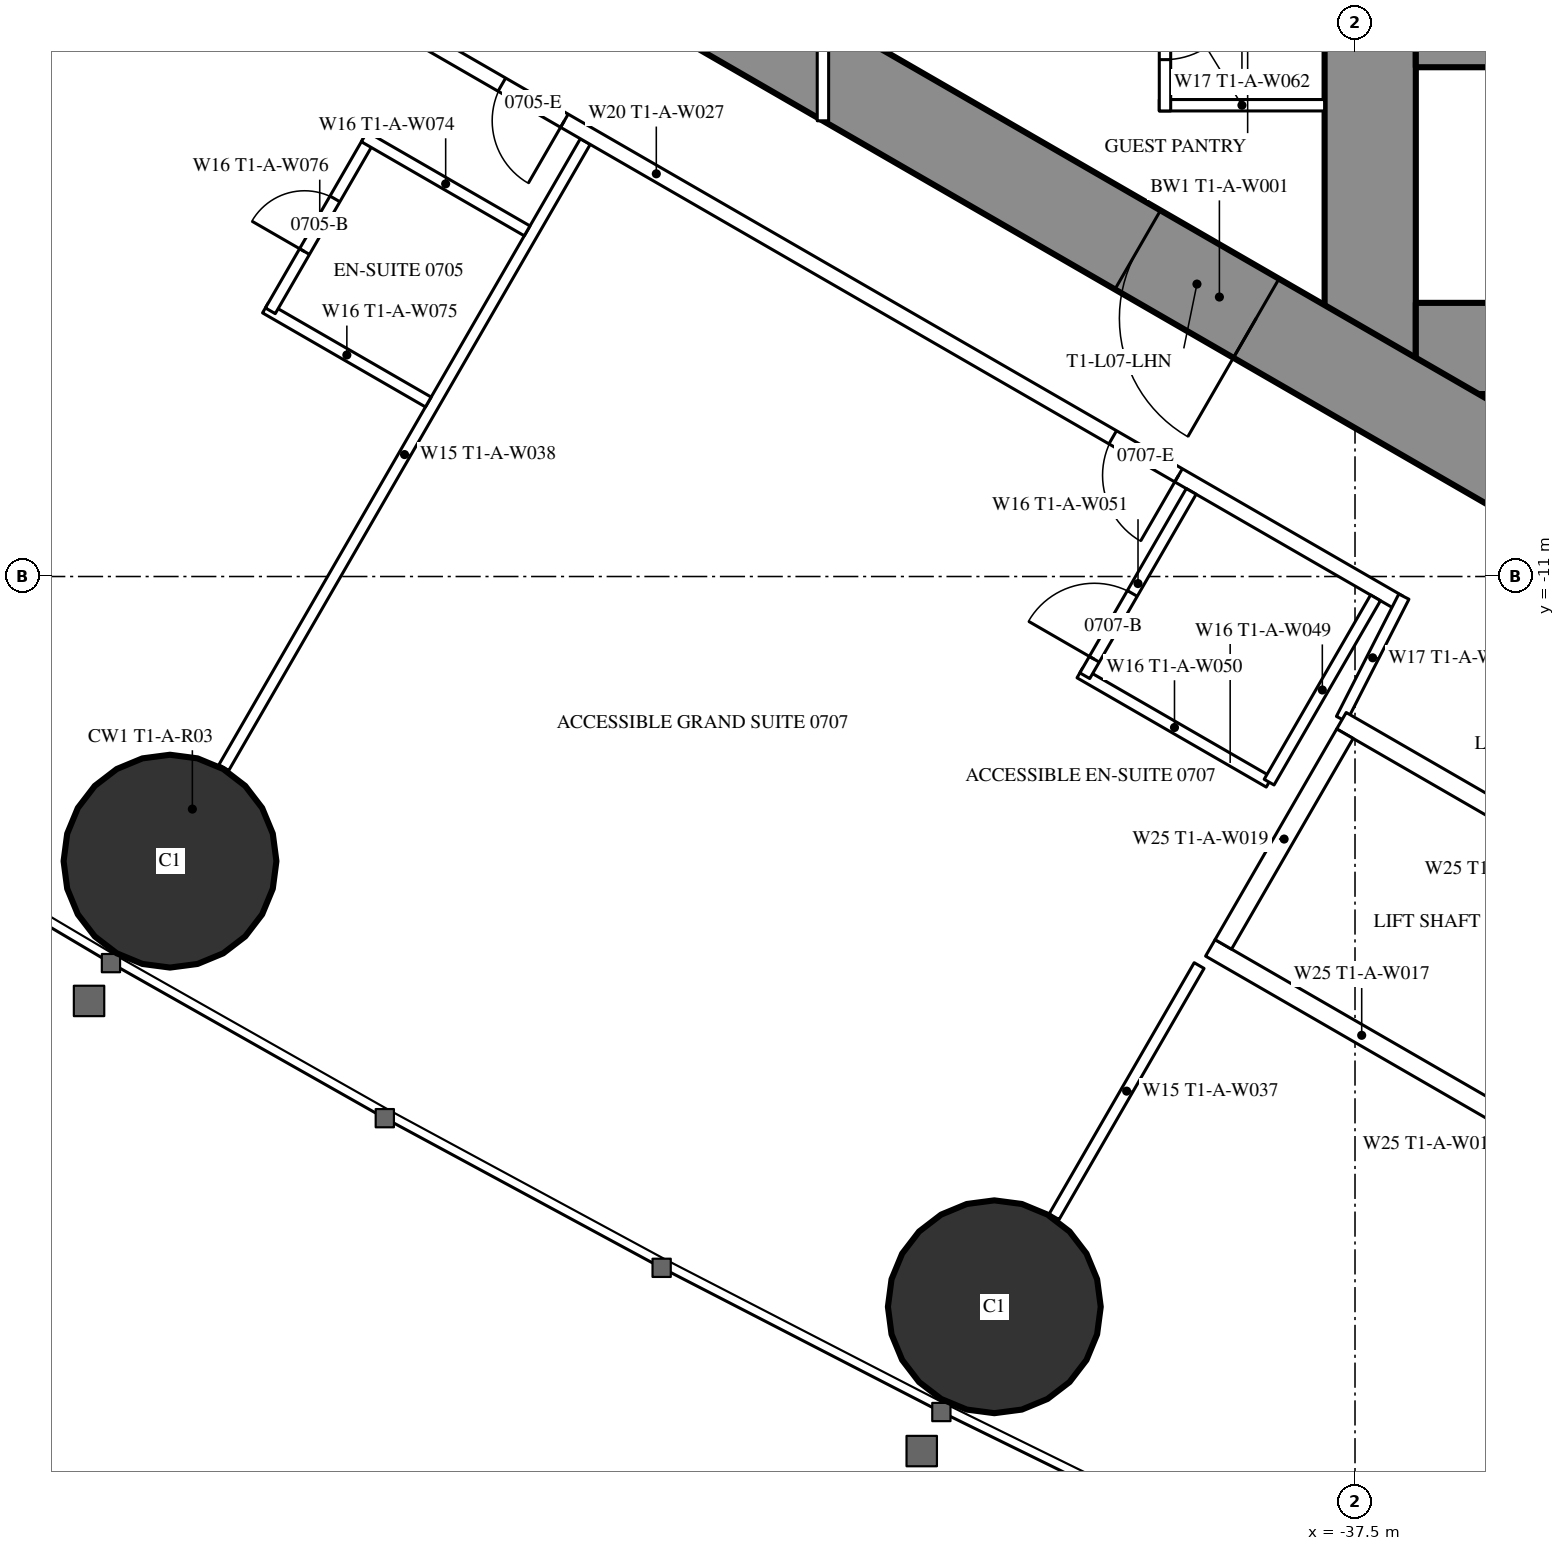
"""IFC4 building model, lengths in metres.
Left out: names, types, materials, properties, quantities, classifications, styles, units other than length and angle.
Written with IfcOpenShell. Run it as: python <this file> out.ifc"""

import sys

from ifc_helpers import new_model, si_unit, direction, frame, frame_2d, origin, origin_2d, place, context, subcontext, project, spatial, rectangle, hollow_circle, extrude, element, fill, save


model = new_model("IFC4")
c1 = context("Model", 3, precision=1e-05, world=origin(), true_north=direction((0.0, 1.0)))
c2 = subcontext(c1, "Body", "Model", "MODEL_VIEW")
j1 = project(units=[si_unit("LENGTHUNIT", "METRE"), si_unit("PLANEANGLEUNIT", "RADIAN")], contexts=[c1])
p1 = place(None, origin())
s1 = spatial("IfcSite", under=j1, at=p1, CompositionType="ELEMENT")
p2 = place(p1, origin())
s2 = spatial("IfcBuilding", under=s1, at=p2, CompositionType="ELEMENT")
p3 = place(p2, frame((0.0, 0.0, 32.0)))
s3 = spatial("IfcBuildingStorey", under=s2, at=p3, CompositionType="ELEMENT", Elevation=32.0)
for number, where, z_axis, x_axis in (
    (1, (-53.09, -14.745, 0.0), (0.0, 0.0, 1.0), (1.0, 0.0, 0.0)),
    (2, (-42.245, -20.607, 0.0), (0.0, 0.0, 1.0), (1.0, 0.0, 0.0)),
):
    element("IfcColumn", number, at=place(p3, frame(where, z_axis=z_axis, x_axis=x_axis)), inside=s3, PredefinedType="COLUMN", context=c2, shape_type="SweptSolid", body=[
        extrude(hollow_circle(Radius=1.4, WallThickness=0.12, at=origin_2d()), origin(), (0.0, 0.0, 1.0), 3.5),
    ])
p4 = place(p3, frame((-37.3, 8.6, 0.0), z_axis=(0.0, 0.0, 1.0), x_axis=(0.0, -1.0, 0.0)))
e3 = element("IfcWall", 3, at=p4, inside=s3, PredefinedType="SHEAR", context=c2, shape_type="SweptSolid", body=[
    extrude(rectangle(XDim=17.2, YDim=1.2, at=frame_2d((8.6, 0.0))), origin(), (0.0, 0.0, 1.0), 3.5),
])
p5 = place(p4, frame((7.7, 0.0, 0.0)))
e4 = element("IfcOpeningElement", 4, at=p5, cuts=e3, PredefinedType="OPENING", context=c2, shape_type="SweptSolid", body=[
    extrude(rectangle(XDim=1.8, YDim=2.2, at=frame_2d((0.9, 1.1))), frame((0.0, 0.61, 0.0), z_axis=(0.0, -1.0, 0.0), x_axis=(1.0, 0.0, 0.0)), (0.0, 0.0, 1.0), 1.22),
])
p6 = place(p3, frame((-28.3, -8.0, 0.0), z_axis=(0.0, 0.0, 1.0), x_axis=(-1.0, 0.0, 0.0)))
e5 = element("IfcWall", 5, at=p6, inside=s3, PredefinedType="SHEAR", context=c2, shape_type="SweptSolid", body=[
    extrude(rectangle(XDim=8.4, YDim=1.2, at=frame_2d((4.2, 0.0))), origin(), (0.0, 0.0, 1.0), 3.5),
])
p7 = place(p6, frame((0.25, 0.0, 0.0)))
e6 = element("IfcOpeningElement", 6, at=p7, cuts=e5, PredefinedType="OPENING", context=c2, shape_type="SweptSolid", body=[
    extrude(rectangle(XDim=1.0, YDim=2.2, at=frame_2d((0.5, 1.1))), frame((0.0, 0.61, 0.0), z_axis=(0.0, -1.0, 0.0), x_axis=(1.0, 0.0, 0.0)), (0.0, 0.0, 1.0), 1.22),
])
p8 = place(p3, frame((-28.3, -4.15, 0.0), z_axis=(0.0, 0.0, 1.0), x_axis=(-1.0, 0.0, 0.0)))
e7 = element("IfcWall", 7, at=p8, inside=s3, PredefinedType="SHEAR", context=c2, shape_type="SweptSolid", body=[
    extrude(rectangle(XDim=8.4, YDim=0.3, at=frame_2d((4.2, 0.0))), origin(), (0.0, 0.0, 1.0), 3.5),
])
p9 = place(p3, frame((-27.2, -14.3, 0.0), z_axis=(0.0, 0.0, 1.0), x_axis=(-0.866024021859, 0.500002393557, 0.0)))
e8 = element("IfcWall", 8, at=p9, inside=s3, PredefinedType="SHEAR", context=c2, shape_type="SweptSolid", body=[
    extrude(rectangle(XDim=27.907, YDim=1.2, at=frame_2d((13.954, 0.0))), origin(), (0.0, 0.0, 1.0), 3.5),
])
p10 = place(p9, frame((4.6, 0.0, 0.0)))
e9 = element("IfcOpeningElement", 9, at=p10, cuts=e8, PredefinedType="OPENING", context=c2, shape_type="SweptSolid", body=[
    extrude(rectangle(XDim=1.0, YDim=2.2, at=frame_2d((0.5, 1.1))), frame((0.0, 0.61, 0.0), z_axis=(0.0, -1.0, 0.0), x_axis=(1.0, 0.0, 0.0)), (0.0, 0.0, 1.0), 1.22),
])
p11 = place(p9, frame((13.395, 0.0, 0.0)))
e10 = element("IfcOpeningElement", 10, at=p11, cuts=e8, PredefinedType="OPENING", context=c2, shape_type="SweptSolid", body=[
    extrude(rectangle(XDim=1.8, YDim=2.2, at=frame_2d((0.9, 1.1))), frame((0.0, 0.61, 0.0), z_axis=(0.0, -1.0, 0.0), x_axis=(1.0, 0.0, 0.0)), (0.0, 0.0, 1.0), 1.22),
])
p12 = place(p3, frame((-47.627, -5.278, 0.0), z_axis=(0.0, 0.0, 1.0), x_axis=(-0.500009844318, -0.86601972009, 0.0)))
e11 = element("IfcWall", 11, at=p12, inside=s3, PredefinedType="PARTITIONING", context=c2, shape_type="SweptSolid", body=[
    extrude(rectangle(XDim=9.51, YDim=0.15, at=frame_2d((4.755, 0.0))), origin(), (0.0, 0.0, 1.0), 2.25),
])
p13 = place(p3, frame((-39.551, -16.118, 0.0), z_axis=(0.0, 0.0, 1.0), x_axis=(-0.499986503906, -0.866033195618, 0.0)))
e12 = element("IfcWall", 12, at=p13, inside=s3, PredefinedType="PARTITIONING", context=c2, shape_type="SweptSolid", body=[
    extrude(rectangle(XDim=3.815, YDim=0.15, at=frame_2d((1.907, 0.0))), origin(), (0.0, 0.0, 1.0), 3.25),
])
p14 = place(p3, frame((-36.92, -11.344, 0.0), z_axis=(0.0, 0.0, 1.0), x_axis=(-0.866028313256, 0.499994960614, 0.0)))
e13 = element("IfcWall", 13, at=p14, inside=s3, PredefinedType="PARTITIONING", context=c2, shape_type="SweptSolid", body=[
    extrude(rectangle(XDim=22.568, YDim=0.2, at=frame_2d((11.284, 0.0))), origin(), (0.0, 0.0, 1.0), 3.25),
])
p15 = place(p14, frame((12.68, 0.0, 0.0)))
e14 = element("IfcOpeningElement", 14, at=p15, cuts=e13, PredefinedType="OPENING", context=c2, shape_type="SweptSolid", body=[
    extrude(rectangle(XDim=0.95, YDim=2.2, at=frame_2d((0.475, 1.1))), frame((0.0, 0.11, 0.0), z_axis=(0.0, -1.0, 0.0), x_axis=(1.0, 0.0, 0.0)), (0.0, 0.0, 1.0), 0.22),
])
p16 = place(p14, frame((3.35, 0.0, 0.0)))
e15 = element("IfcOpeningElement", 15, at=p16, cuts=e13, PredefinedType="OPENING", context=c2, shape_type="SweptSolid", body=[
    extrude(rectangle(XDim=1.0, YDim=2.2, at=frame_2d((0.5, 1.1))), frame((0.0, 0.11, 0.0), z_axis=(0.0, -1.0, 0.0), x_axis=(1.0, 0.0, 0.0)), (0.0, 0.0, 1.0), 0.22),
])
p17 = place(p3, frame((-36.857, -11.265, 0.0), z_axis=(0.0, 0.0, 1.0), x_axis=(-0.454225294761, -0.890886851176, 0.0)))
e16 = element("IfcWall", 16, at=p17, inside=s3, PredefinedType="PARTITIONING", context=c2, shape_type="SweptSolid", body=[
    extrude(rectangle(XDim=1.807, YDim=0.15, at=frame_2d((0.904, 0.0))), origin(), (0.0, 0.0, 1.0), 3.25),
])
p18 = place(p3, frame((-49.692, -8.704, 0.0), z_axis=(0.0, 0.0, 1.0), x_axis=(-0.866073894602, 0.499916002032, 0.0)))
e17 = element("IfcWall", 17, at=p18, inside=s3, PredefinedType="PARTITIONING", context=c2, shape_type="SweptSolid", body=[
    extrude(rectangle(XDim=2.475, YDim=0.15, at=frame_2d((1.238, 0.0))), origin(), (0.0, 0.0, 1.0), 3.25),
])
p19 = place(p3, frame((-50.47, -5.253, 0.0), z_axis=(0.0, 0.0, 1.0), x_axis=(-0.500006934395, -0.866021400173, 0.0)))
e18 = element("IfcWall", 18, at=p19, inside=s3, PredefinedType="PARTITIONING", context=c2, shape_type="SweptSolid", body=[
    extrude(rectangle(XDim=2.6, YDim=0.15, at=frame_2d((1.3, 0.0))), origin(), (0.0, 0.0, 1.0), 3.25),
])
p20 = place(p19, frame((0.9, 0.0, 0.0)))
e19 = element("IfcOpeningElement", 19, at=p20, cuts=e18, PredefinedType="OPENING", context=c2, shape_type="SweptSolid", body=[
    extrude(rectangle(XDim=0.8, YDim=2.2, at=frame_2d((0.4, 1.1))), frame((0.0, 0.085, 0.0), z_axis=(0.0, -1.0, 0.0), x_axis=(1.0, 0.0, 0.0)), (0.0, 0.0, 1.0), 0.17),
])
p21 = place(p3, frame((-48.392, -6.453, 0.0), z_axis=(0.0, 0.0, 1.0), x_axis=(-0.86604923931, 0.499958713387, 0.0)))
e20 = element("IfcWall", 20, at=p21, inside=s3, PredefinedType="PARTITIONING", context=c2, shape_type="SweptSolid", body=[
    extrude(rectangle(XDim=2.475, YDim=0.15, at=frame_2d((1.237, 0.0))), origin(), (0.0, 0.0, 1.0), 3.25),
])
p22 = place(p3, frame((-38.63, -13.705, 0.0), z_axis=(0.0, 0.0, 1.0), x_axis=(-0.866018712932, 0.500011588718, 0.0)))
e21 = element("IfcWall", 21, at=p22, inside=s3, PredefinedType="PARTITIONING", context=c2, shape_type="SweptSolid", body=[
    extrude(rectangle(XDim=2.875, YDim=0.15, at=frame_2d((1.438, 0.0))), origin(), (0.0, 0.0, 1.0), 3.25),
])
p23 = place(p3, frame((-39.655, -9.88, 0.0), z_axis=(0.0, 0.0, 1.0), x_axis=(-0.500049511043, -0.865996816683, 0.0)))
e22 = element("IfcWall", 22, at=p23, inside=s3, PredefinedType="PARTITIONING", context=c2, shape_type="SweptSolid", body=[
    extrude(rectangle(XDim=2.8, YDim=0.15, at=frame_2d((1.4, 0.0))), origin(), (0.0, 0.0, 1.0), 3.25),
])
p24 = place(p23, frame((1.55, 0.0, 0.0)))
e23 = element("IfcOpeningElement", 23, at=p24, cuts=e22, PredefinedType="OPENING", context=c2, shape_type="SweptSolid", body=[
    extrude(rectangle(XDim=1.0, YDim=2.2, at=frame_2d((0.5, 1.1))), frame((0.0, 0.085, 0.0), z_axis=(0.0, -1.0, 0.0), x_axis=(1.0, 0.0, 0.0)), (0.0, 0.0, 1.0), 0.17),
])
p25 = place(p3, frame((-37.23, -11.281, 0.0), z_axis=(0.0, 0.0, 1.0), x_axis=(-0.500049511043, -0.865996816683, 0.0)))
e24 = element("IfcWall", 24, at=p25, inside=s3, PredefinedType="PARTITIONING", context=c2, shape_type="SweptSolid", body=[
    extrude(rectangle(XDim=2.8, YDim=0.15, at=frame_2d((1.4, 0.0))), origin(), (0.0, 0.0, 1.0), 3.25),
])
p26 = place(p3, frame((-37.9, -4.8, 0.0), z_axis=(0.0, 0.0, 1.0), x_axis=(-1.0, 0.0, 0.0)))
e25 = element("IfcWall", 25, at=p26, inside=s3, PredefinedType="PARTITIONING", context=c2, shape_type="SweptSolid", body=[
    extrude(rectangle(XDim=2.175, YDim=0.15, at=frame_2d((1.087, 0.0))), origin(), (0.0, 0.0, 1.0), 3.25),
])
p27 = place(p3, frame((-40.0, -2.525, 0.0), z_axis=(0.0, 0.0, 1.0), x_axis=(0.0, -1.0, 0.0)))
e26 = element("IfcWall", 26, at=p27, inside=s3, PredefinedType="PARTITIONING", context=c2, shape_type="SweptSolid", body=[
    extrude(rectangle(XDim=2.35, YDim=0.15, at=frame_2d((1.175, 0.0))), origin(), (0.0, 0.0, 1.0), 3.25),
])
p28 = place(p27, frame((0.675, 0.0, 0.0)))
e27 = element("IfcOpeningElement", 27, at=p28, cuts=e26, PredefinedType="OPENING", context=c2, shape_type="SweptSolid", body=[
    extrude(rectangle(XDim=1.0, YDim=2.2, at=frame_2d((0.5, 1.1))), frame((0.0, 0.085, 0.0), z_axis=(0.0, -1.0, 0.0), x_axis=(1.0, 0.0, 0.0)), (0.0, 0.0, 1.0), 0.17),
])
p29 = place(p3, frame((-44.5, 5.005, 0.0), z_axis=(0.0, 0.0, 1.0), x_axis=(0.0, -1.0, 0.0)))
e28 = element("IfcWall", 28, at=p29, inside=s3, PredefinedType="PARTITIONING", context=c2, shape_type="SweptSolid", body=[
    extrude(rectangle(XDim=10.009, YDim=0.15, at=frame_2d((5.005, 0.0))), origin(), (0.0, 0.0, 1.0), 2.45),
])
p30 = place(p29, frame((2.002, 0.0, 0.0)))
e29 = element("IfcOpeningElement", 29, at=p30, cuts=e28, PredefinedType="OPENING", context=c2, shape_type="SweptSolid", body=[
    extrude(rectangle(XDim=1.0, YDim=2.2, at=frame_2d((0.5, 1.1))), frame((0.0, 0.085, 0.0), z_axis=(0.0, -1.0, 0.0), x_axis=(1.0, 0.0, 0.0)), (0.0, 0.0, 1.0), 0.17),
])
p31 = place(p29, frame((7.007, 0.0, 0.0)))
e30 = element("IfcOpeningElement", 30, at=p31, cuts=e28, PredefinedType="OPENING", context=c2, shape_type="SweptSolid", body=[
    extrude(rectangle(XDim=1.0, YDim=2.2, at=frame_2d((0.5, 1.1))), frame((0.0, 0.085, 0.0), z_axis=(0.0, -1.0, 0.0), x_axis=(1.0, 0.0, 0.0)), (0.0, 0.0, 1.0), 0.17),
])
p32 = place(p3, frame((-33.696, -15.197, 0.0), z_axis=(0.0, 0.0, 1.0), x_axis=(-0.865976953817, 0.500083908417, 0.0)))
e31 = element("IfcWall", 31, at=p32, inside=s3, PredefinedType="PARTITIONING", context=c2, shape_type="SweptSolid", body=[
    extrude(rectangle(XDim=4.599, YDim=0.25, at=frame_2d((2.3, 0.0))), origin(), (0.0, 0.0, 1.0), 3.25),
])
p33 = place(p3, frame((-35.42, -18.186, 0.0), z_axis=(0.0, 0.0, 1.0), x_axis=(-0.865990227814, 0.50006092162, 0.0)))
e32 = element("IfcWall", 32, at=p33, inside=s3, PredefinedType="PARTITIONING", context=c2, shape_type="SweptSolid", body=[
    extrude(rectangle(XDim=4.6, YDim=0.25, at=frame_2d((2.3, 0.0))), origin(), (0.0, 0.0, 1.0), 3.25),
])
p34 = place(p3, frame((-37.633, -13.068, 0.0), z_axis=(0.0, 0.0, 1.0), x_axis=(-0.499872130319, -0.866099216793, 0.0)))
e33 = element("IfcWall", 33, at=p34, inside=s3, PredefinedType="PARTITIONING", context=c2, shape_type="SweptSolid", body=[
    extrude(rectangle(XDim=3.2, YDim=0.25, at=frame_2d((1.6, 0.0))), origin(), (0.0, 0.0, 1.0), 3.25),
])
p35 = place(p20, origin())
e34 = element("IfcDoor", 34, at=p35, inside=s3, OperationType="SINGLE_SWING_RIGHT", PredefinedType="DOOR", context=c2, shape_type="SweptSolid", body=[
    extrude(rectangle(XDim=0.8, YDim=2.2, at=frame_2d((0.4, 1.1))), frame((0.0, 0.025, 0.0), z_axis=(0.0, -1.0, 0.0), x_axis=(1.0, 0.0, 0.0)), (0.0, 0.0, 1.0), 0.05),
])
fill(e19, e34)
p36 = place(p15, origin())
e35 = element("IfcDoor", 35, at=p36, inside=s3, OperationType="SINGLE_SWING_LEFT", PredefinedType="DOOR", context=c2, shape_type="SweptSolid", body=[
    extrude(rectangle(XDim=0.95, YDim=2.2, at=frame_2d((0.475, 1.1))), frame((0.0, 0.025, 0.0), z_axis=(0.0, -1.0, 0.0), x_axis=(1.0, 0.0, 0.0)), (0.0, 0.0, 1.0), 0.05),
])
fill(e14, e35)
p37 = place(p24, origin())
e36 = element("IfcDoor", 36, at=p37, inside=s3, OperationType="SINGLE_SWING_RIGHT", PredefinedType="DOOR", context=c2, shape_type="SweptSolid", body=[
    extrude(rectangle(XDim=1.0, YDim=2.2, at=frame_2d((0.5, 1.1))), frame((0.0, 0.025, 0.0), z_axis=(0.0, -1.0, 0.0), x_axis=(1.0, 0.0, 0.0)), (0.0, 0.0, 1.0), 0.05),
])
fill(e23, e36)
p38 = place(p16, origin())
e37 = element("IfcDoor", 37, at=p38, inside=s3, OperationType="SINGLE_SWING_LEFT", PredefinedType="DOOR", context=c2, shape_type="SweptSolid", body=[
    extrude(rectangle(XDim=1.0, YDim=2.2, at=frame_2d((0.5, 1.1))), frame((0.0, 0.025, 0.0), z_axis=(0.0, -1.0, 0.0), x_axis=(1.0, 0.0, 0.0)), (0.0, 0.0, 1.0), 0.05),
])
fill(e15, e37)
p39 = place(p28, origin())
e38 = element("IfcDoor", 38, at=p39, inside=s3, OperationType="SINGLE_SWING_LEFT", PredefinedType="DOOR", context=c2, shape_type="SweptSolid", body=[
    extrude(rectangle(XDim=1.0, YDim=2.2, at=frame_2d((0.5, 1.1))), frame((0.0, 0.025, 0.0), z_axis=(0.0, -1.0, 0.0), x_axis=(1.0, 0.0, 0.0)), (0.0, 0.0, 1.0), 0.05),
])
fill(e27, e38)
p40 = place(p11, origin())
e39 = element("IfcDoor", 39, at=p40, inside=s3, OperationType="DOUBLE_DOOR_SINGLE_SWING", PredefinedType="DOOR", context=c2, shape_type="SweptSolid", body=[
    extrude(rectangle(XDim=1.8, YDim=2.2, at=frame_2d((0.9, 1.1))), frame((0.0, 0.025, 0.0), z_axis=(0.0, -1.0, 0.0), x_axis=(1.0, 0.0, 0.0)), (0.0, 0.0, 1.0), 0.05),
])
fill(e10, e39)
save(model, sys.argv[1])
